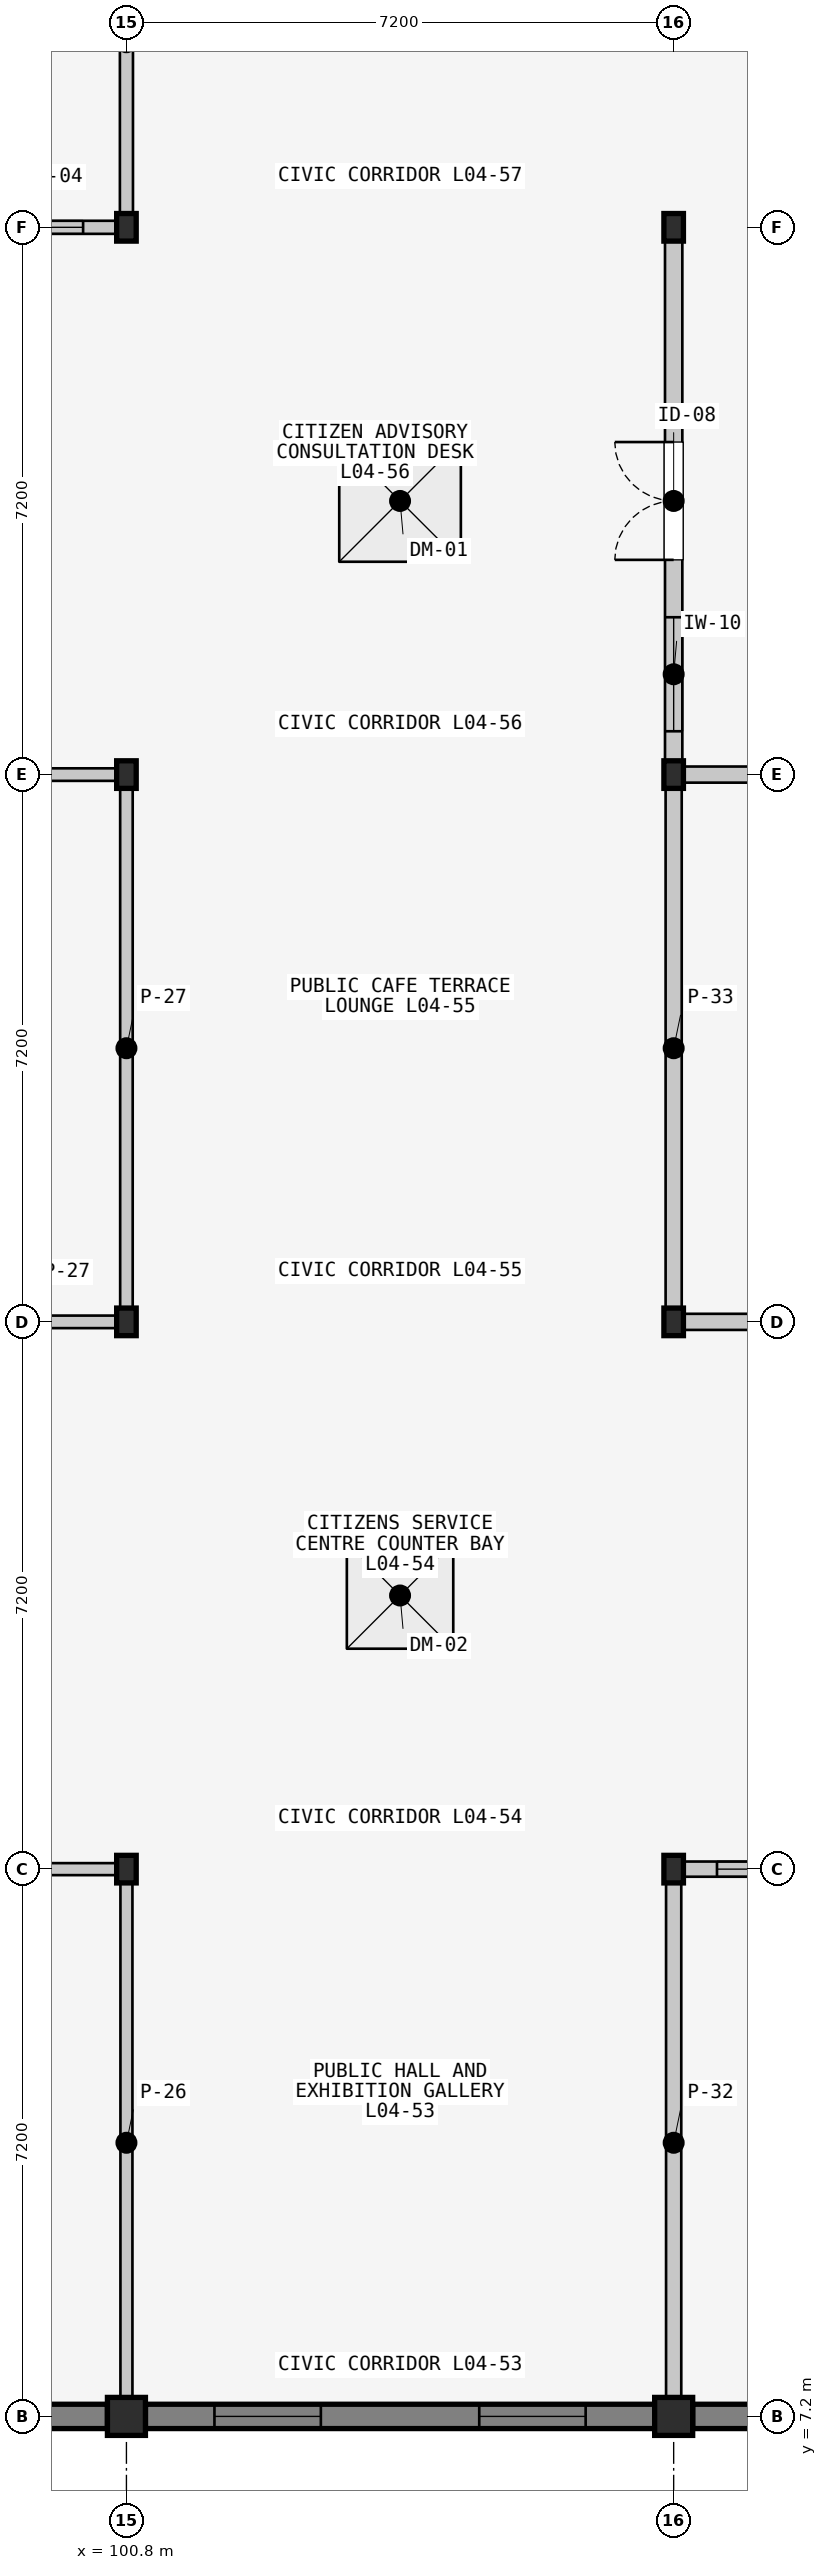
"""IFC4 building model, lengths in metres.
Left out: names, types, materials, properties, quantities, classifications, styles, units other than length and angle.
Written with IfcOpenShell. Run it as: python <this file> out.ifc"""

import sys

from ifc_helpers import new_model, si_unit, direction, frame, frame_2d, origin, origin_2d, place, context, subcontext, project, spatial, rectangle, i_section, extrude, element, fill, save


model = new_model("IFC4")
c1 = context("Model", 3, precision=1e-05, world=origin(), true_north=direction((0.0, 1.0)))
c2 = subcontext(c1, "Body", "Model", "MODEL_VIEW")
j1 = project(units=[si_unit("LENGTHUNIT", "METRE"), si_unit("PLANEANGLEUNIT", "RADIAN")], contexts=[c1])
p1 = place(None, origin())
s1 = spatial("IfcSite", under=j1, at=p1, CompositionType="ELEMENT")
p2 = place(p1, origin())
s2 = spatial("IfcBuilding", under=s1, at=p2, CompositionType="ELEMENT")
p3 = place(p2, frame((0.0, 0.0, 14.1)))
s3 = spatial("IfcBuildingStorey", under=s2, at=p3, CompositionType="ELEMENT", Elevation=14.1)
p4 = place(p3, frame((100.8, 7.2, 0.0), z_axis=(0.0, 0.0, 1.0), x_axis=(1.0, 0.0, 0.0)))
e1 = element("IfcColumn", 1, at=p4, inside=s3, PredefinedType="COLUMN", context=c2, shape_type="SweptSolid", body=[
    extrude(rectangle(XDim=0.5, YDim=0.5, at=origin_2d()), origin(), (0.0, 0.0, 1.0), 5.019),
])
p5 = place(p3, frame((100.8, 14.4, 0.0), z_axis=(0.0, 0.0, 1.0), x_axis=(1.0, 0.0, 0.0)))
e2 = element("IfcColumn", 2, at=p5, inside=s3, PredefinedType="COLUMN", context=c2, shape_type="SweptSolid", body=[
    extrude(i_section(OverallWidth=0.257, OverallDepth=0.363, WebThickness=0.013, FlangeThickness=0.022, FilletRadius=0.015, at=origin_2d()), origin(), (0.0, 0.0, 1.0), 6.362),
])
p6 = place(p3, frame((100.8, 21.6, 0.0), z_axis=(0.0, 0.0, 1.0), x_axis=(1.0, 0.0, 0.0)))
e3 = element("IfcColumn", 3, at=p6, inside=s3, PredefinedType="COLUMN", context=c2, shape_type="SweptSolid", body=[
    extrude(i_section(OverallWidth=0.257, OverallDepth=0.363, WebThickness=0.013, FlangeThickness=0.022, FilletRadius=0.015, at=origin_2d()), origin(), (0.0, 0.0, 1.0), 7.705),
])
p7 = place(p3, frame((100.8, 28.8, 0.0), z_axis=(0.0, 0.0, 1.0), x_axis=(1.0, 0.0, 0.0)))
e4 = element("IfcColumn", 4, at=p7, inside=s3, PredefinedType="COLUMN", context=c2, shape_type="SweptSolid", body=[
    extrude(i_section(OverallWidth=0.257, OverallDepth=0.363, WebThickness=0.013, FlangeThickness=0.022, FilletRadius=0.015, at=origin_2d()), origin(), (0.0, 0.0, 1.0), 9.048),
])
p8 = place(p3, frame((100.8, 36.0, 0.0), z_axis=(0.0, 0.0, 1.0), x_axis=(1.0, 0.0, 0.0)))
e5 = element("IfcColumn", 5, at=p8, inside=s3, PredefinedType="COLUMN", context=c2, shape_type="SweptSolid", body=[
    extrude(i_section(OverallWidth=0.257, OverallDepth=0.363, WebThickness=0.013, FlangeThickness=0.022, FilletRadius=0.015, at=origin_2d()), origin(), (0.0, 0.0, 1.0), 10.39),
])
p9 = place(p3, frame((108.0, 7.2, 0.0), z_axis=(0.0, 0.0, 1.0), x_axis=(1.0, 0.0, 0.0)))
e6 = element("IfcColumn", 6, at=p9, inside=s3, PredefinedType="COLUMN", context=c2, shape_type="SweptSolid", body=[
    extrude(rectangle(XDim=0.5, YDim=0.5, at=origin_2d()), origin(), (0.0, 0.0, 1.0), 5.048),
])
p10 = place(p3, frame((108.0, 14.4, 0.0), z_axis=(0.0, 0.0, 1.0), x_axis=(1.0, 0.0, 0.0)))
e7 = element("IfcColumn", 7, at=p10, inside=s3, PredefinedType="COLUMN", context=c2, shape_type="SweptSolid", body=[
    extrude(i_section(OverallWidth=0.257, OverallDepth=0.363, WebThickness=0.013, FlangeThickness=0.022, FilletRadius=0.015, at=origin_2d()), origin(), (0.0, 0.0, 1.0), 6.39),
])
p11 = place(p3, frame((108.0, 21.6, 0.0), z_axis=(0.0, 0.0, 1.0), x_axis=(1.0, 0.0, 0.0)))
e8 = element("IfcColumn", 8, at=p11, inside=s3, PredefinedType="COLUMN", context=c2, shape_type="SweptSolid", body=[
    extrude(i_section(OverallWidth=0.257, OverallDepth=0.363, WebThickness=0.013, FlangeThickness=0.022, FilletRadius=0.015, at=origin_2d()), origin(), (0.0, 0.0, 1.0), 7.733),
])
p12 = place(p3, frame((108.0, 28.8, 0.0), z_axis=(0.0, 0.0, 1.0), x_axis=(1.0, 0.0, 0.0)))
e9 = element("IfcColumn", 9, at=p12, inside=s3, PredefinedType="COLUMN", context=c2, shape_type="SweptSolid", body=[
    extrude(i_section(OverallWidth=0.257, OverallDepth=0.363, WebThickness=0.013, FlangeThickness=0.022, FilletRadius=0.015, at=origin_2d()), origin(), (0.0, 0.0, 1.0), 9.076),
])
p13 = place(p3, frame((108.0, 36.0, 0.0), z_axis=(0.0, 0.0, 1.0), x_axis=(1.0, 0.0, 0.0)))
e10 = element("IfcColumn", 10, at=p13, inside=s3, PredefinedType="COLUMN", context=c2, shape_type="SweptSolid", body=[
    extrude(i_section(OverallWidth=0.257, OverallDepth=0.363, WebThickness=0.013, FlangeThickness=0.022, FilletRadius=0.015, at=origin_2d()), origin(), (0.0, 0.0, 1.0), 10.419),
])
p14 = place(p3, frame((100.55, 7.2, 0.0), z_axis=(0.0, 0.0, 1.0), x_axis=(-1.0, 0.0, 0.0)))
e11 = element("IfcWall", 11, at=p14, inside=s3, PredefinedType="SOLIDWALL", context=c2, shape_type="SweptSolid", body=[
    extrude(rectangle(XDim=6.7, YDim=0.32, at=frame_2d((3.35, 0.0))), origin(), (0.0, 0.0, 1.0), 4.263),
])
p15 = place(p3, frame((107.75, 7.2, 0.0), z_axis=(0.0, 0.0, 1.0), x_axis=(-1.0, 0.0, 0.0)))
e12 = element("IfcWall", 12, at=p15, inside=s3, PredefinedType="SOLIDWALL", context=c2, shape_type="SweptSolid", body=[
    extrude(rectangle(XDim=6.7, YDim=0.32, at=frame_2d((3.35, 0.0))), origin(), (0.0, 0.0, 1.0), 4.292),
])
p16 = place(p15, frame((0.908, 0.0, 0.95)))
e13 = element("IfcOpeningElement", 13, at=p16, cuts=e12, PredefinedType="OPENING", context=c2, shape_type="SweptSolid", body=[
    extrude(rectangle(XDim=1.4, YDim=2.1, at=frame_2d((0.7, 1.05))), frame((0.0, 0.17, 0.0), z_axis=(0.0, -1.0, 0.0), x_axis=(1.0, 0.0, 0.0)), (0.0, 0.0, 1.0), 0.34),
])
p17 = place(p15, frame((4.392, 0.0, 0.95)))
e14 = element("IfcOpeningElement", 14, at=p17, cuts=e12, PredefinedType="OPENING", context=c2, shape_type="SweptSolid", body=[
    extrude(rectangle(XDim=1.4, YDim=2.1, at=frame_2d((0.7, 1.05))), frame((0.0, 0.17, 0.0), z_axis=(0.0, -1.0, 0.0), x_axis=(1.0, 0.0, 0.0)), (0.0, 0.0, 1.0), 0.34),
])
p18 = place(p3, frame((114.95, 7.2, 0.0), z_axis=(0.0, 0.0, 1.0), x_axis=(-1.0, 0.0, 0.0)))
e15 = element("IfcWall", 15, at=p18, inside=s3, PredefinedType="SOLIDWALL", context=c2, shape_type="SweptSolid", body=[
    extrude(rectangle(XDim=6.7, YDim=0.32, at=frame_2d((3.35, 0.0))), origin(), (0.0, 0.0, 1.0), 4.321),
])
p19 = place(p3, frame((93.88, 14.4, 0.0), z_axis=(0.0, 0.0, 1.0), x_axis=(1.0, 0.0, 0.0)))
e16 = element("IfcWall", 16, at=p19, inside=s3, PredefinedType="PARTITIONING", context=c2, shape_type="SweptSolid", body=[
    extrude(rectangle(XDim=6.8, YDim=0.158, at=frame_2d((3.4, 0.0))), origin(), (0.0, 0.0, 1.0), 3.72),
])
p20 = place(p19, frame((2.45, 0.0, 0.0)))
e17 = element("IfcOpeningElement", 17, at=p20, cuts=e16, PredefinedType="OPENING", context=c2, shape_type="SweptSolid", body=[
    extrude(rectangle(XDim=1.9, YDim=2.45, at=frame_2d((0.95, 1.225))), frame((0.0, 0.089, 0.0), z_axis=(0.0, -1.0, 0.0), x_axis=(1.0, 0.0, 0.0)), (0.0, 0.0, 1.0), 0.178),
])
p21 = place(p3, frame((100.8, 14.28, 0.0), z_axis=(0.0, 0.0, 1.0), x_axis=(0.0, -1.0, 0.0)))
e18 = element("IfcWall", 18, at=p21, inside=s3, PredefinedType="PARTITIONING", context=c2, shape_type="SweptSolid", body=[
    extrude(rectangle(XDim=6.96, YDim=0.158, at=frame_2d((3.48, 0.0))), origin(), (0.0, 0.0, 1.0), 3.72),
])
p22 = place(p3, frame((100.68, 21.6, 0.0), z_axis=(0.0, 0.0, 1.0), x_axis=(-1.0, 0.0, 0.0)))
e19 = element("IfcWall", 19, at=p22, inside=s3, PredefinedType="PARTITIONING", context=c2, shape_type="SweptSolid", body=[
    extrude(rectangle(XDim=6.8, YDim=0.165, at=frame_2d((3.4, 0.0))), origin(), (0.0, 0.0, 1.0), 3.72),
])
p23 = place(p22, frame((2.5, 0.0, 0.0)))
e20 = element("IfcOpeningElement", 20, at=p23, cuts=e19, PredefinedType="OPENING", context=c2, shape_type="SweptSolid", body=[
    extrude(rectangle(XDim=1.8, YDim=2.4, at=frame_2d((0.9, 1.2))), frame((0.0, 0.093, 0.0), z_axis=(0.0, -1.0, 0.0), x_axis=(1.0, 0.0, 0.0)), (0.0, 0.0, 1.0), 0.185),
])
p24 = place(p3, frame((93.88, 28.8, 0.0), z_axis=(0.0, 0.0, 1.0), x_axis=(1.0, 0.0, 0.0)))
e21 = element("IfcWall", 21, at=p24, inside=s3, PredefinedType="PARTITIONING", context=c2, shape_type="SweptSolid", body=[
    extrude(rectangle(XDim=6.8, YDim=0.165, at=frame_2d((3.4, 0.0))), origin(), (0.0, 0.0, 1.0), 3.72),
])
p25 = place(p3, frame((100.8, 28.68, 0.0), z_axis=(0.0, 0.0, 1.0), x_axis=(0.0, -1.0, 0.0)))
e22 = element("IfcWall", 22, at=p25, inside=s3, PredefinedType="PARTITIONING", context=c2, shape_type="SweptSolid", body=[
    extrude(rectangle(XDim=6.96, YDim=0.165, at=frame_2d((3.48, 0.0))), origin(), (0.0, 0.0, 1.0), 3.72),
])
p26 = place(p3, frame((100.68, 36.0, 0.0), z_axis=(0.0, 0.0, 1.0), x_axis=(-1.0, 0.0, 0.0)))
e23 = element("IfcWall", 23, at=p26, inside=s3, PredefinedType="PARTITIONING", context=c2, shape_type="SweptSolid", body=[
    extrude(rectangle(XDim=6.96, YDim=0.172, at=frame_2d((3.48, 0.0))), origin(), (0.0, 0.0, 1.0), 3.72),
])
p27 = place(p26, frame((2.705, 0.0, 0.0)))
e24 = element("IfcOpeningElement", 24, at=p27, cuts=e23, PredefinedType="OPENING", context=c2, shape_type="SweptSolid", body=[
    extrude(rectangle(XDim=1.55, YDim=2.3, at=frame_2d((0.775, 1.15))), frame((0.0, 0.096, 0.0), z_axis=(0.0, -1.0, 0.0), x_axis=(1.0, 0.0, 0.0)), (0.0, 0.0, 1.0), 0.192),
])
p28 = place(p26, frame((0.45, 0.0, 1.05)))
e25 = element("IfcOpeningElement", 25, at=p28, cuts=e23, PredefinedType="OPENING", context=c2, shape_type="SweptSolid", body=[
    extrude(rectangle(XDim=1.8, YDim=1.4, at=frame_2d((0.9, 0.7))), frame((0.0, 0.096, 0.0), z_axis=(0.0, -1.0, 0.0), x_axis=(1.0, 0.0, 0.0)), (0.0, 0.0, 1.0), 0.192),
])
p29 = place(p3, frame((100.8, 43.08, 0.0), z_axis=(0.0, 0.0, 1.0), x_axis=(0.0, -1.0, 0.0)))
e26 = element("IfcWall", 26, at=p29, inside=s3, PredefinedType="PARTITIONING", context=c2, shape_type="SweptSolid", body=[
    extrude(rectangle(XDim=6.96, YDim=0.172, at=frame_2d((3.48, 0.0))), origin(), (0.0, 0.0, 1.0), 3.72),
])
p30 = place(p3, frame((108.12, 14.4, 0.0), z_axis=(0.0, 0.0, 1.0), x_axis=(1.0, 0.0, 0.0)))
e27 = element("IfcWall", 27, at=p30, inside=s3, PredefinedType="PARTITIONING", context=c2, shape_type="SweptSolid", body=[
    extrude(rectangle(XDim=6.8, YDim=0.2, at=frame_2d((3.4, 0.0))), origin(), (0.0, 0.0, 1.0), 3.72),
])
p31 = place(p30, frame((2.45, 0.0, 0.0)))
e28 = element("IfcOpeningElement", 28, at=p31, cuts=e27, PredefinedType="OPENING", context=c2, shape_type="SweptSolid", body=[
    extrude(rectangle(XDim=1.9, YDim=2.45, at=frame_2d((0.95, 1.225))), frame((0.0, 0.11, 0.0), z_axis=(0.0, -1.0, 0.0), x_axis=(1.0, 0.0, 0.0)), (0.0, 0.0, 1.0), 0.22),
])
p32 = place(p30, frame((0.45, 0.0, 1.05)))
e29 = element("IfcOpeningElement", 29, at=p32, cuts=e27, PredefinedType="OPENING", context=c2, shape_type="SweptSolid", body=[
    extrude(rectangle(XDim=1.4, YDim=1.2, at=frame_2d((0.7, 0.6))), frame((0.0, 0.11, 0.0), z_axis=(0.0, -1.0, 0.0), x_axis=(1.0, 0.0, 0.0)), (0.0, 0.0, 1.0), 0.22),
])
p33 = place(p3, frame((108.0, 7.32, 0.0), z_axis=(0.0, 0.0, 1.0), x_axis=(0.0, 1.0, 0.0)))
e30 = element("IfcWall", 30, at=p33, inside=s3, PredefinedType="PARTITIONING", context=c2, shape_type="SweptSolid", body=[
    extrude(rectangle(XDim=6.96, YDim=0.2, at=frame_2d((3.48, 0.0))), origin(), (0.0, 0.0, 1.0), 3.72),
])
p34 = place(p3, frame((114.92, 21.6, 0.0), z_axis=(0.0, 0.0, 1.0), x_axis=(-1.0, 0.0, 0.0)))
e31 = element("IfcWall", 31, at=p34, inside=s3, PredefinedType="PARTITIONING", context=c2, shape_type="SweptSolid", body=[
    extrude(rectangle(XDim=6.8, YDim=0.212, at=frame_2d((3.4, 0.0))), origin(), (0.0, 0.0, 1.0), 3.72),
])
p35 = place(p34, frame((2.5, 0.0, 0.0)))
e32 = element("IfcOpeningElement", 32, at=p35, cuts=e31, PredefinedType="OPENING", context=c2, shape_type="SweptSolid", body=[
    extrude(rectangle(XDim=1.8, YDim=2.4, at=frame_2d((0.9, 1.2))), frame((0.0, 0.116, 0.0), z_axis=(0.0, -1.0, 0.0), x_axis=(1.0, 0.0, 0.0)), (0.0, 0.0, 1.0), 0.232),
])
p36 = place(p34, frame((0.45, 0.0, 1.05)))
e33 = element("IfcOpeningElement", 33, at=p36, cuts=e31, PredefinedType="OPENING", context=c2, shape_type="SweptSolid", body=[
    extrude(rectangle(XDim=1.45, YDim=1.15, at=frame_2d((0.725, 0.575))), frame((0.0, 0.116, 0.0), z_axis=(0.0, -1.0, 0.0), x_axis=(1.0, 0.0, 0.0)), (0.0, 0.0, 1.0), 0.232),
])
p37 = place(p3, frame((108.12, 28.8, 0.0), z_axis=(0.0, 0.0, 1.0), x_axis=(1.0, 0.0, 0.0)))
e34 = element("IfcWall", 34, at=p37, inside=s3, PredefinedType="PARTITIONING", context=c2, shape_type="SweptSolid", body=[
    extrude(rectangle(XDim=6.8, YDim=0.212, at=frame_2d((3.4, 0.0))), origin(), (0.0, 0.0, 1.0), 3.72),
])
p38 = place(p3, frame((108.0, 21.72, 0.0), z_axis=(0.0, 0.0, 1.0), x_axis=(0.0, 1.0, 0.0)))
e35 = element("IfcWall", 35, at=p38, inside=s3, PredefinedType="PARTITIONING", context=c2, shape_type="SweptSolid", body=[
    extrude(rectangle(XDim=6.96, YDim=0.212, at=frame_2d((3.48, 0.0))), origin(), (0.0, 0.0, 1.0), 3.72),
])
p39 = place(p3, frame((108.0, 28.92, 0.0), z_axis=(0.0, 0.0, 1.0), x_axis=(0.0, 1.0, 0.0)))
e36 = element("IfcWall", 36, at=p39, inside=s3, PredefinedType="PARTITIONING", context=c2, shape_type="SweptSolid", body=[
    extrude(rectangle(XDim=6.96, YDim=0.228, at=frame_2d((3.48, 0.0))), origin(), (0.0, 0.0, 1.0), 3.72),
])
p40 = place(p39, frame((2.705, 0.0, 0.0)))
e37 = element("IfcOpeningElement", 37, at=p40, cuts=e36, PredefinedType="OPENING", context=c2, shape_type="SweptSolid", body=[
    extrude(rectangle(XDim=1.55, YDim=2.3, at=frame_2d((0.775, 1.15))), frame((0.0, 0.124, 0.0), z_axis=(0.0, -1.0, 0.0), x_axis=(1.0, 0.0, 0.0)), (0.0, 0.0, 1.0), 0.248),
])
p41 = place(p39, frame((0.45, 0.0, 1.05)))
e38 = element("IfcOpeningElement", 38, at=p41, cuts=e36, PredefinedType="OPENING", context=c2, shape_type="SweptSolid", body=[
    extrude(rectangle(XDim=1.5, YDim=1.15, at=frame_2d((0.75, 0.575))), frame((0.0, 0.124, 0.0), z_axis=(0.0, -1.0, 0.0), x_axis=(1.0, 0.0, 0.0)), (0.0, 0.0, 1.0), 0.248),
])
p42 = place(p16, origin())
e39 = element("IfcWindow", 39, at=p42, inside=s3, PartitioningType="SINGLE_PANEL", PredefinedType="WINDOW", context=c2, shape_type="SweptSolid", body=[
    extrude(rectangle(XDim=1.4, YDim=2.1, at=frame_2d((0.7, 1.05))), frame((0.0, 0.03, 0.0), z_axis=(0.0, -1.0, 0.0), x_axis=(1.0, 0.0, 0.0)), (0.0, 0.0, 1.0), 0.06),
])
fill(e13, e39)
p43 = place(p17, origin())
e40 = element("IfcWindow", 40, at=p43, inside=s3, PartitioningType="SINGLE_PANEL", PredefinedType="WINDOW", context=c2, shape_type="SweptSolid", body=[
    extrude(rectangle(XDim=1.4, YDim=2.1, at=frame_2d((0.7, 1.05))), frame((0.0, 0.03, 0.0), z_axis=(0.0, -1.0, 0.0), x_axis=(1.0, 0.0, 0.0)), (0.0, 0.0, 1.0), 0.06),
])
fill(e14, e40)
p44 = place(p3, frame((64.8, 7.2, 5.1), z_axis=(-0.003900009496, -0.183347177316, 0.983040488737), x_axis=(0.999992130387, 0.0, 0.003967261622)))
p45 = place(p44, frame((39.608, 10.986, 0.0)))
p46 = place(p45, origin())
e41 = element("IfcWindow", 41, at=p46, inside=s3, PartitioningType="SINGLE_PANEL", PredefinedType="LIGHTDOME", context=c2, shape_type="SweptSolid", body=[
    extrude(rectangle(XDim=1.4, YDim=1.4, at=origin_2d()), origin(), (0.0, 0.0, -1.0), 0.06),
])
p47 = place(p44, frame((39.619, 25.635, 0.0)))
p48 = place(p47, origin())
e42 = element("IfcWindow", 42, at=p48, inside=s3, PartitioningType="SINGLE_PANEL", PredefinedType="LIGHTDOME", context=c2, shape_type="SweptSolid", body=[
    extrude(rectangle(XDim=1.6, YDim=1.6, at=origin_2d()), origin(), (0.0, 0.0, -1.0), 0.06),
])
p49 = place(p28, origin())
e43 = element("IfcWindow", 43, at=p49, inside=s3, PartitioningType="SINGLE_PANEL", PredefinedType="WINDOW", context=c2, shape_type="SweptSolid", body=[
    extrude(rectangle(XDim=1.8, YDim=1.4, at=frame_2d((0.9, 0.7))), frame((0.0, 0.03, 0.0), z_axis=(0.0, -1.0, 0.0), x_axis=(1.0, 0.0, 0.0)), (0.0, 0.0, 1.0), 0.06),
])
fill(e25, e43)
p50 = place(p32, origin())
e44 = element("IfcWindow", 44, at=p50, inside=s3, PartitioningType="SINGLE_PANEL", PredefinedType="WINDOW", context=c2, shape_type="SweptSolid", body=[
    extrude(rectangle(XDim=1.4, YDim=1.2, at=frame_2d((0.7, 0.6))), frame((0.0, 0.03, 0.0), z_axis=(0.0, -1.0, 0.0), x_axis=(1.0, 0.0, 0.0)), (0.0, 0.0, 1.0), 0.06),
])
fill(e29, e44)
p51 = place(p40, origin())
e45 = element("IfcDoor", 45, at=p51, inside=s3, OperationType="DOUBLE_DOOR_SINGLE_SWING", PredefinedType="DOOR", context=c2, shape_type="SweptSolid", body=[
    extrude(rectangle(XDim=1.55, YDim=2.3, at=frame_2d((0.775, 1.15))), frame((0.0, 0.025, 0.0), z_axis=(0.0, -1.0, 0.0), x_axis=(1.0, 0.0, 0.0)), (0.0, 0.0, 1.0), 0.05),
])
fill(e37, e45)
p52 = place(p41, origin())
e46 = element("IfcWindow", 46, at=p52, inside=s3, PartitioningType="SINGLE_PANEL", PredefinedType="WINDOW", context=c2, shape_type="SweptSolid", body=[
    extrude(rectangle(XDim=1.5, YDim=1.15, at=frame_2d((0.75, 0.575))), frame((0.0, 0.03, 0.0), z_axis=(0.0, -1.0, 0.0), x_axis=(1.0, 0.0, 0.0)), (0.0, 0.0, 1.0), 0.06),
])
fill(e38, e46)
save(model, sys.argv[1])
